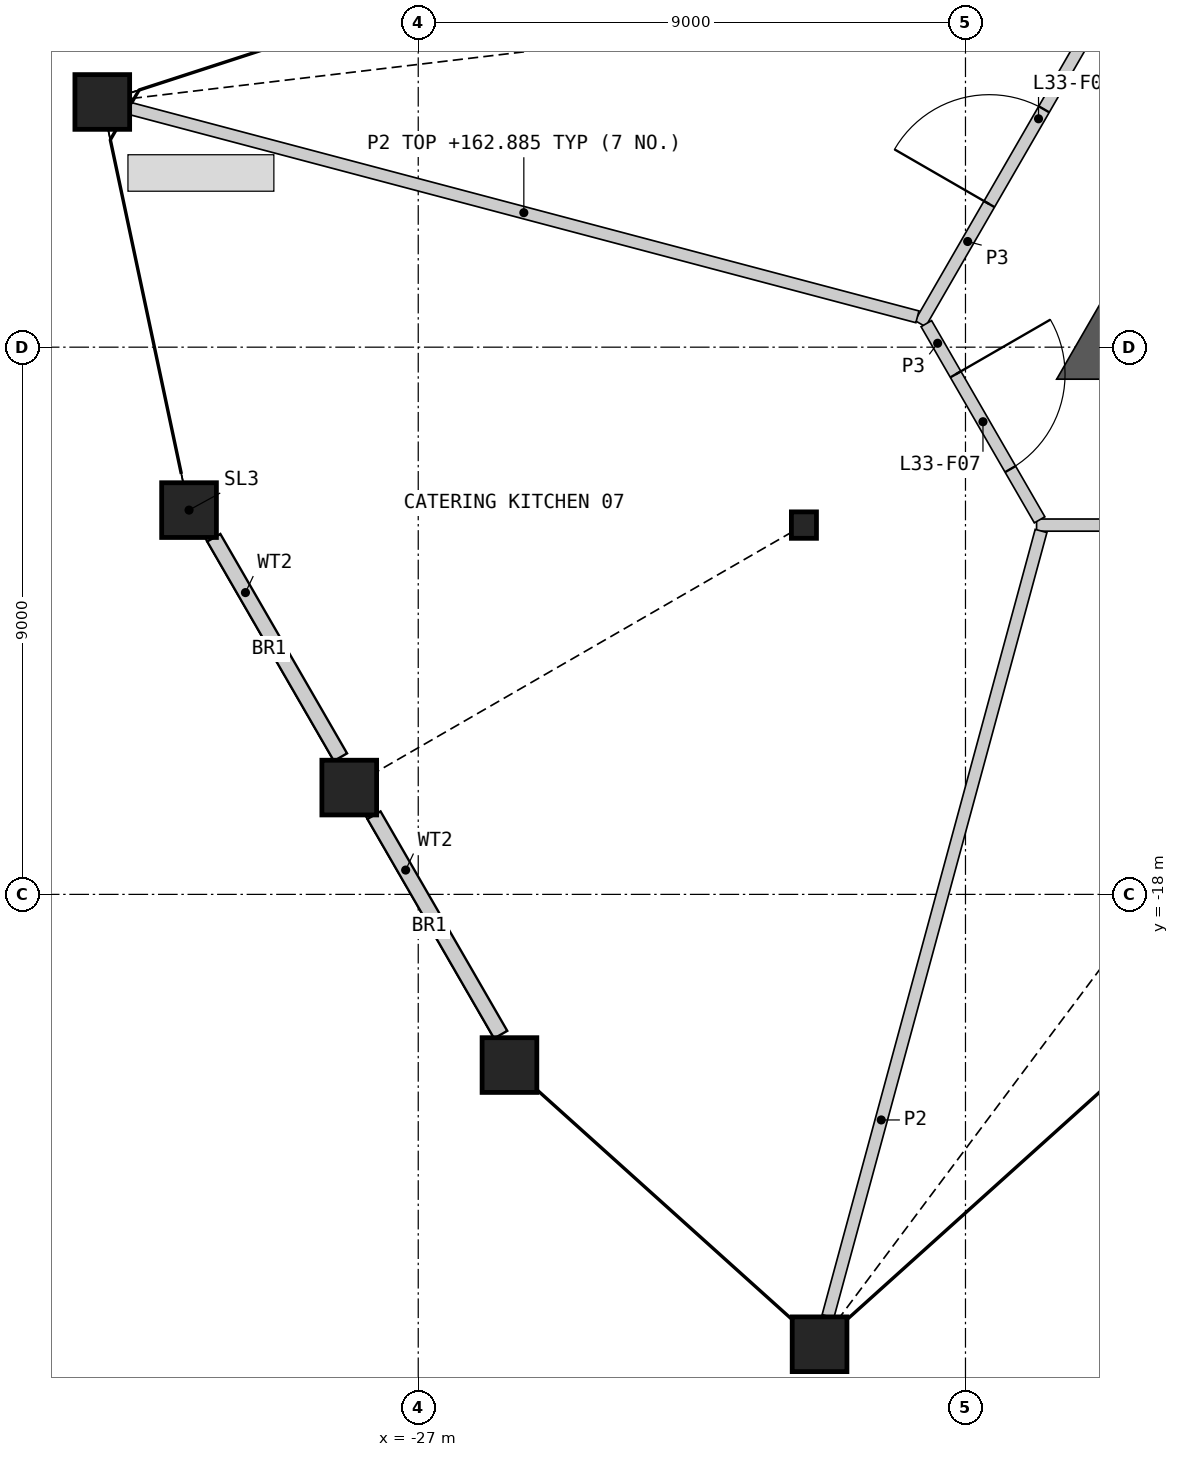
"""IFC4 building model, lengths in metres.
Left out: names, types, materials, properties, quantities, classifications, styles, units other than length and angle.
Written with IfcOpenShell. Run it as: python <this file> out.ifc"""

import sys

from ifc_helpers import new_model, si_unit, direction, frame, frame_2d, origin, origin_2d, place, context, subcontext, project, spatial, polyline, rectangle, hollow_rectangle, i_section, outline, extrude, element, fill, save


model = new_model("IFC4")
c1 = context("Model", 3, precision=1e-05, world=origin(), true_north=direction((0.0, 1.0)))
c2 = subcontext(c1, "Body", "Model", "MODEL_VIEW")
j1 = project(units=[si_unit("LENGTHUNIT", "METRE"), si_unit("PLANEANGLEUNIT", "RADIAN")], contexts=[c1])
p1 = place(None, origin())
s1 = spatial("IfcSite", under=j1, at=p1, CompositionType="ELEMENT")
p2 = place(p1, origin())
s2 = spatial("IfcBuilding", under=s1, at=p2, CompositionType="ELEMENT")
p3 = place(p2, frame((0.0, 0.0, 154.2)))
s3 = spatial("IfcBuildingStorey", under=s2, at=p3, CompositionType="ELEMENT", Elevation=154.2)
for number, where, z_axis, x_axis in (
    (1, (-25.5, -20.807, 0.0), (0.0, 0.0, 1.0), (1.0, 0.0, 0.0)),
    (2, (-20.4, -25.399, 0.0), (0.0, 0.0, 1.0), (1.0, 0.0, 0.0)),
    (3, (-32.196, -4.967, 0.0), (0.0, 0.0, 1.0), (1.0, 0.0, 0.0)),
    (4, (-30.769, -11.68, 0.0), (0.0, 0.0, 1.0), (1.0, 0.0, 0.0)),
    (5, (-28.135, -16.243, 0.0), (0.0, 0.0, 1.0), (1.0, 0.0, 0.0)),
):
    element("IfcColumn", number, at=place(p3, frame(where, z_axis=z_axis, x_axis=x_axis)), inside=s3, PredefinedType="COLUMN", context=c2, shape_type="SweptSolid", body=[
        extrude(hollow_rectangle(XDim=0.9, YDim=0.9, WallThickness=0.06, at=origin_2d()), origin(), (0.0, 0.0, 1.0), 10.0),
    ])
p4 = place(p3, frame((-20.657, -11.926, 0.0), z_axis=(0.0, 0.0, 1.0), x_axis=(1.0, 0.0, 0.0)))
e6 = element("IfcColumn", 6, at=p4, inside=s3, PredefinedType="COLUMN", context=c2, shape_type="SweptSolid", body=[
    extrude(i_section(OverallWidth=0.412, OverallDepth=0.435, WebThickness=0.036, FlangeThickness=0.057, at=origin_2d()), origin(), (0.0, 0.0, 1.0), 10.0),
])
for number, where, z_axis, x_axis in (
    (7, (-30.363, -12.134, 0.0), (0.0, 0.0, 1.0), (0.5, -0.866, 0.0)),
    (8, (-27.728, -16.698, 0.0), (0.0, 0.0, 1.0), (0.5, -0.866, 0.0)),
):
    element("IfcWall", number, at=place(p3, frame(where, z_axis=z_axis, x_axis=x_axis)), inside=s3, PredefinedType="SOLIDWALL", context=c2, shape_type="SweptSolid", body=[
        extrude(rectangle(XDim=4.167, YDim=0.25, at=frame_2d((2.084, 0.0))), origin(), (0.0, 0.0, 1.0), 8.989),
    ])
p5 = place(p3, origin())
e9 = element("IfcWall", 9, at=p5, inside=s3, PredefinedType="SHEAR", context=c2, shape_type="SweptSolid", body=[
    extrude(outline(polyline([(-14.941, -8.626), (-14.941, -9.526), (-16.5, -9.526), (-15.721, -8.176), (-14.941, -8.626)])), origin(), (0.0, 0.0, 1.0), 9.6),
])
p6 = place(p3, frame((-16.831, -11.926, 0.0), z_axis=(0.0, 0.0, 1.0), x_axis=(1.0, 0.0, 0.0)))
e10 = element("IfcWall", 10, at=p6, inside=s3, PredefinedType="PARTITIONING", context=c2, shape_type="SweptSolid", body=[
    extrude(rectangle(XDim=6.275, YDim=0.2, at=frame_2d((3.137, 0.0))), origin(), (0.0, 0.0, 1.0), 9.6),
])
p7 = place(p3, frame((-18.744, -8.613, 0.0), z_axis=(0.0, 0.0, 1.0), x_axis=(0.499997920671, 0.866026604282, 0.0)))
e11 = element("IfcWall", 11, at=p7, inside=s3, PredefinedType="PARTITIONING", context=c2, shape_type="SweptSolid", body=[
    extrude(rectangle(XDim=6.24, YDim=0.2, at=frame_2d((3.12, 0.0))), origin(), (0.0, 0.0, 1.0), 9.6),
])
p8 = place(p7, frame((2.271, 0.0, 0.0)))
e12 = element("IfcOpeningElement", 12, at=p8, cuts=e11, PredefinedType="OPENING", context=c2, shape_type="SweptSolid", body=[
    extrude(rectangle(XDim=1.8, YDim=2.1, at=frame_2d((0.9, 1.05))), frame((0.0, 0.11, 0.0), z_axis=(0.0, -1.0, 0.0), x_axis=(1.0, 0.0, 0.0)), (0.0, 0.0, 1.0), 0.22),
])
p9 = place(p3, frame((-18.644, -8.613, 0.0), z_axis=(0.0, 0.0, 1.0), x_axis=(0.499958791762, -0.866049194065, 0.0)))
e13 = element("IfcWall", 13, at=p9, inside=s3, PredefinedType="PARTITIONING", context=c2, shape_type="SweptSolid", body=[
    extrude(rectangle(XDim=3.726, YDim=0.2, at=frame_2d((1.863, 0.0))), origin(), (0.0, 0.0, 1.0), 9.6),
])
p10 = place(p9, frame((0.963, 0.0, 0.0)))
e14 = element("IfcOpeningElement", 14, at=p10, cuts=e13, PredefinedType="OPENING", context=c2, shape_type="SweptSolid", body=[
    extrude(rectangle(XDim=1.8, YDim=2.1, at=frame_2d((0.9, 1.05))), frame((0.0, 0.11, 0.0), z_axis=(0.0, -1.0, 0.0), x_axis=(1.0, 0.0, 0.0)), (0.0, 0.0, 1.0), 0.22),
])
p11 = place(p3, frame((-31.736, -5.075, 0.0), z_axis=(0.0, 0.0, 1.0), x_axis=(0.966727906646, -0.255806869555, 0.0)))
e15 = element("IfcWall", 15, at=p11, inside=s3, PredefinedType="PARTITIONING", context=c2, shape_type="SweptSolid", body=[
    extrude(rectangle(XDim=13.391, YDim=0.2, at=frame_2d((6.696, 0.0))), origin(), (0.0, 0.0, 1.0), 8.685),
])
p12 = place(p3, frame((-20.261, -24.939, 0.0), z_axis=(0.0, 0.0, 1.0), x_axis=(0.261845290604, 0.965109860994, 0.0)))
e16 = element("IfcWall", 16, at=p12, inside=s3, PredefinedType="PARTITIONING", context=c2, shape_type="SweptSolid", body=[
    extrude(rectangle(XDim=13.384, YDim=0.2, at=frame_2d((6.692, 0.0))), origin(), (0.0, 0.0, 1.0), 8.685),
])
p13 = place(p8, origin())
e17 = element("IfcDoor", 17, at=p13, inside=s3, OperationType="DOUBLE_DOOR_SINGLE_SWING", PredefinedType="DOOR", context=c2, shape_type="SweptSolid", body=[
    extrude(rectangle(XDim=1.8, YDim=2.1, at=frame_2d((0.9, 1.05))), frame((0.0, 0.025, 0.0), z_axis=(0.0, -1.0, 0.0), x_axis=(1.0, 0.0, 0.0)), (0.0, 0.0, 1.0), 0.05),
])
fill(e12, e17)
p14 = place(p10, origin())
e18 = element("IfcDoor", 18, at=p14, inside=s3, OperationType="DOUBLE_DOOR_SINGLE_SWING", PredefinedType="DOOR", context=c2, shape_type="SweptSolid", body=[
    extrude(rectangle(XDim=1.8, YDim=2.1, at=frame_2d((0.9, 1.05))), frame((0.0, 0.025, 0.0), z_axis=(0.0, -1.0, 0.0), x_axis=(1.0, 0.0, 0.0)), (0.0, 0.0, 1.0), 0.05),
])
fill(e14, e18)
save(model, sys.argv[1])
